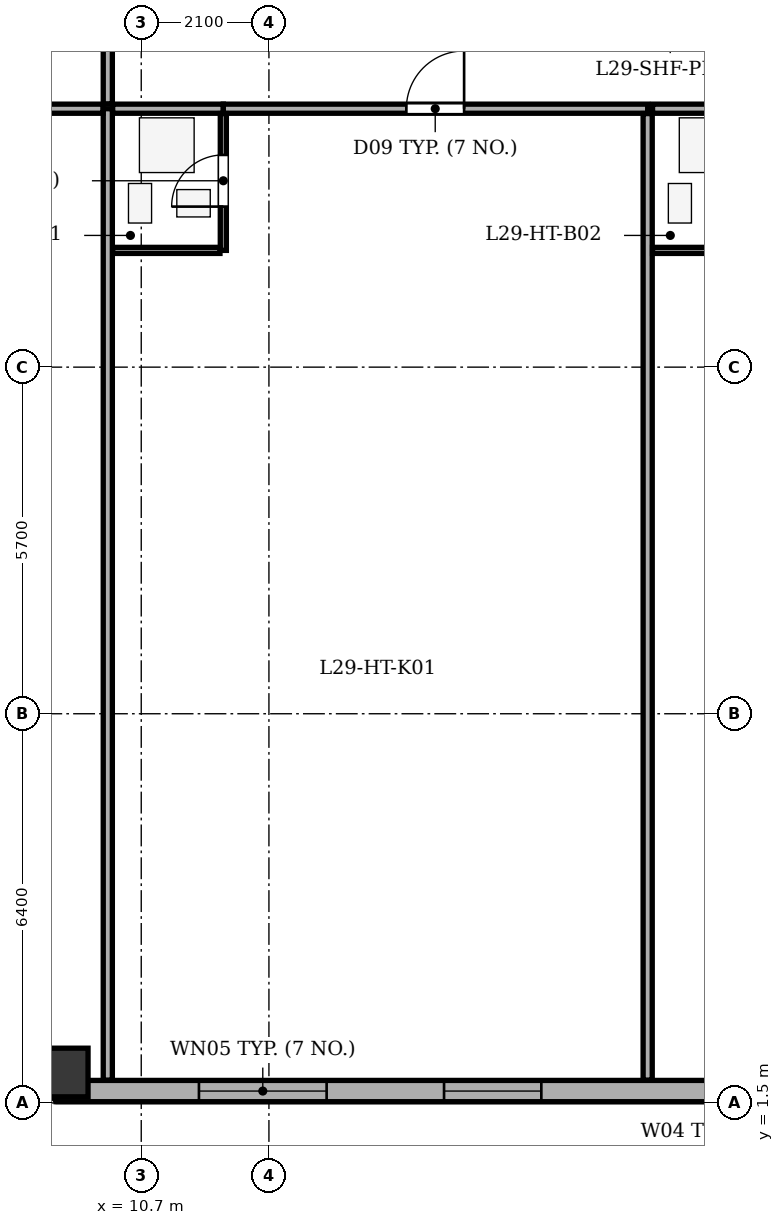
"""IFC4 building model, lengths in metres.
Left out: names, types, materials, properties, quantities, classifications, styles, units other than length and angle.
Written with IfcOpenShell. Run it as: python <this file> out.ifc"""

import sys

from ifc_helpers import new_model, si_unit, direction, frame, frame_2d, origin, origin_2d, place, context, subcontext, project, spatial, rectangle, extrude, element, fill, save


model = new_model("IFC4")
c1 = context("Model", 3, precision=1e-05, world=origin(), true_north=direction((0.0, 1.0)))
c2 = subcontext(c1, "Body", "Model", "MODEL_VIEW")
j1 = project(units=[si_unit("LENGTHUNIT", "METRE"), si_unit("PLANEANGLEUNIT", "RADIAN")], contexts=[c1])
p1 = place(None, origin())
s1 = spatial("IfcSite", under=j1, at=p1, CompositionType="ELEMENT")
p2 = place(p1, origin())
s2 = spatial("IfcBuilding", under=s1, at=p2, CompositionType="ELEMENT")
p3 = place(p2, frame((0.0, 0.0, 120.3)))
s3 = spatial("IfcBuildingStorey", under=s2, at=p3, CompositionType="ELEMENT", Elevation=120.3)
p4 = place(p3, frame((9.3, 2.0, 0.0), z_axis=(0.0, 0.0, 1.0), x_axis=(1.0, 0.0, 0.0)))
e1 = element("IfcColumn", 1, at=p4, inside=s3, PredefinedType="COLUMN", context=c2, shape_type="SweptSolid", body=[
    extrude(rectangle(XDim=0.8, YDim=1.05, at=origin_2d()), origin(), (0.0, 0.0, 1.0), 3.5),
])
p5 = place(p3, frame((44.3, 1.695, 0.0), z_axis=(0.0, 0.0, 1.0), x_axis=(-1.0, 0.0, 0.0)))
e2 = element("IfcWall", 2, at=p5, inside=s3, PredefinedType="STANDARD", context=c2, shape_type="SweptSolid", body=[
    extrude(rectangle(XDim=35.0, YDim=0.35, at=frame_2d((17.5, 0.0))), origin(), (0.0, 0.0, 1.0), 2.785),
])
p6 = place(p5, frame((19.6, 0.0, 0.0)))
e3 = element("IfcOpeningElement", 3, at=p6, cuts=e2, PredefinedType="OPENING", context=c2, shape_type="SweptSolid", body=[
    extrude(rectangle(XDim=1.0, YDim=2.02, at=frame_2d((0.5, 1.01))), frame((0.0, 0.185, 0.0), z_axis=(0.0, -1.0, 0.0), x_axis=(1.0, 0.0, 0.0)), (0.0, 0.0, 1.0), 0.37),
])
p7 = place(p5, frame((1.508, 0.0, 0.75)))
e4 = element("IfcOpeningElement", 4, at=p7, cuts=e2, PredefinedType="OPENING", context=c2, shape_type="SweptSolid", body=[
    extrude(rectangle(XDim=1.6, YDim=1.75, at=frame_2d((0.8, 0.875))), frame((0.0, 0.185, 0.0), z_axis=(0.0, -1.0, 0.0), x_axis=(1.0, 0.0, 0.0)), (0.0, 0.0, 1.0), 0.37),
])
p8 = place(p5, frame((4.338, 0.0, 0.75)))
e5 = element("IfcOpeningElement", 5, at=p8, cuts=e2, PredefinedType="OPENING", context=c2, shape_type="SweptSolid", body=[
    extrude(rectangle(XDim=1.6, YDim=1.75, at=frame_2d((0.8, 0.875))), frame((0.0, 0.185, 0.0), z_axis=(0.0, -1.0, 0.0), x_axis=(1.0, 0.0, 0.0)), (0.0, 0.0, 1.0), 0.37),
])
p9 = place(p5, frame((10.406, 0.0, 0.75)))
e6 = element("IfcOpeningElement", 6, at=p9, cuts=e2, PredefinedType="OPENING", context=c2, shape_type="SweptSolid", body=[
    extrude(rectangle(XDim=1.6, YDim=1.75, at=frame_2d((0.8, 0.875))), frame((0.0, 0.185, 0.0), z_axis=(0.0, -1.0, 0.0), x_axis=(1.0, 0.0, 0.0)), (0.0, 0.0, 1.0), 0.37),
])
p10 = place(p5, frame((13.003, 0.0, 0.75)))
e7 = element("IfcOpeningElement", 7, at=p10, cuts=e2, PredefinedType="OPENING", context=c2, shape_type="SweptSolid", body=[
    extrude(rectangle(XDim=1.6, YDim=1.75, at=frame_2d((0.8, 0.875))), frame((0.0, 0.185, 0.0), z_axis=(0.0, -1.0, 0.0), x_axis=(1.0, 0.0, 0.0)), (0.0, 0.0, 1.0), 0.37),
])
p11 = place(p5, frame((27.02, 0.0, 0.75)))
e8 = element("IfcOpeningElement", 8, at=p11, cuts=e2, PredefinedType="OPENING", context=c2, shape_type="SweptSolid", body=[
    extrude(rectangle(XDim=1.6, YDim=1.75, at=frame_2d((0.8, 0.875))), frame((0.0, 0.185, 0.0), z_axis=(0.0, -1.0, 0.0), x_axis=(1.0, 0.0, 0.0)), (0.0, 0.0, 1.0), 0.37),
])
p12 = place(p5, frame((30.551, 0.0, 0.75)))
e9 = element("IfcOpeningElement", 9, at=p12, cuts=e2, PredefinedType="OPENING", context=c2, shape_type="SweptSolid", body=[
    extrude(rectangle(XDim=2.1, YDim=1.75, at=frame_2d((1.05, 0.875))), frame((0.0, 0.185, 0.0), z_axis=(0.0, -1.0, 0.0), x_axis=(1.0, 0.0, 0.0)), (0.0, 0.0, 1.0), 0.37),
])
p13 = place(p3, frame((9.3, 1.695, 0.0), z_axis=(0.0, 0.0, 1.0), x_axis=(-0.707106781187, 0.707106781187, 0.0)))
e10 = element("IfcWall", 10, at=p13, inside=s3, PredefinedType="STANDARD", context=c2, shape_type="SweptSolid", body=[
    extrude(rectangle(XDim=6.795, YDim=0.35, at=frame_2d((3.397, 0.0))), origin(), (0.0, 0.0, 1.0), 2.785),
])
p14 = place(p13, frame((2.698, 0.0, 0.75)))
e11 = element("IfcOpeningElement", 11, at=p14, cuts=e10, PredefinedType="OPENING", context=c2, shape_type="SweptSolid", body=[
    extrude(rectangle(XDim=1.4, YDim=1.65, at=frame_2d((0.7, 0.825))), frame((0.0, 0.185, 0.0), z_axis=(0.0, -1.0, 0.0), x_axis=(1.0, 0.0, 0.0)), (0.0, 0.0, 1.0), 0.37),
])
p15 = place(p3, frame((10.15, 1.875, 0.0), z_axis=(0.0, 0.0, 1.0), x_axis=(0.0, 1.0, 0.0)))
e12 = element("IfcWall", 12, at=p15, inside=s3, PredefinedType="PARTITIONING", context=c2, shape_type="SweptSolid", body=[
    extrude(rectangle(XDim=15.975, YDim=0.15, at=frame_2d((7.988, 0.0))), origin(), (0.0, 0.0, 1.0), 3.2),
])
p16 = place(p3, frame((10.23, 17.85, 0.0), z_axis=(0.0, 0.0, 1.0), x_axis=(1.0, 0.0, 0.0)))
e13 = element("IfcWall", 13, at=p16, inside=s3, PredefinedType="PARTITIONING", context=c2, shape_type="SweptSolid", body=[
    extrude(rectangle(XDim=1.82, YDim=0.15, at=frame_2d((0.91, 0.0))), origin(), (0.0, 0.0, 1.0), 3.2),
])
p17 = place(p3, frame((12.05, 17.85, 0.0), z_axis=(0.0, 0.0, 1.0), x_axis=(1.0, 0.0, 0.0)))
e14 = element("IfcWall", 14, at=p17, inside=s3, PredefinedType="PARTITIONING", context=c2, shape_type="SweptSolid", body=[
    extrude(rectangle(XDim=6.979, YDim=0.15, at=frame_2d((3.49, 0.0))), origin(), (0.0, 0.0, 1.0), 3.2),
])
p18 = place(p17, frame((3.01, 0.0, 0.0)))
e15 = element("IfcOpeningElement", 15, at=p18, cuts=e14, PredefinedType="OPENING", context=c2, shape_type="SweptSolid", body=[
    extrude(rectangle(XDim=0.95, YDim=2.1, at=frame_2d((0.475, 1.05))), frame((0.0, 0.085, 0.0), z_axis=(0.0, -1.0, 0.0), x_axis=(1.0, 0.0, 0.0)), (0.0, 0.0, 1.0), 0.17),
])
p19 = place(p3, frame((12.05, 15.52, 0.0), z_axis=(0.0, 0.0, 1.0), x_axis=(0.0, 1.0, 0.0)))
e16 = element("IfcWall", 16, at=p19, inside=s3, PredefinedType="PARTITIONING", context=c2, shape_type="SweptSolid", body=[
    extrude(rectangle(XDim=2.25, YDim=0.1, at=frame_2d((1.125, 0.0))), origin(), (0.0, 0.0, 1.0), 3.2),
])
p20 = place(p19, frame((0.72, 0.0, 0.0)))
e17 = element("IfcOpeningElement", 17, at=p20, cuts=e16, PredefinedType="OPENING", context=c2, shape_type="SweptSolid", body=[
    extrude(rectangle(XDim=0.85, YDim=2.05, at=frame_2d((0.425, 1.025))), frame((0.0, 0.06, 0.0), z_axis=(0.0, -1.0, 0.0), x_axis=(1.0, 0.0, 0.0)), (0.0, 0.0, 1.0), 0.12),
])
p21 = place(p3, frame((10.23, 15.52, 0.0), z_axis=(0.0, 0.0, 1.0), x_axis=(1.0, 0.0, 0.0)))
e18 = element("IfcWall", 18, at=p21, inside=s3, PredefinedType="PARTITIONING", context=c2, shape_type="SweptSolid", body=[
    extrude(rectangle(XDim=1.765, YDim=0.1, at=frame_2d((0.883, 0.0))), origin(), (0.0, 0.0, 1.0), 3.2),
])
p22 = place(p3, frame((19.029, 1.875, 0.0), z_axis=(0.0, 0.0, 1.0), x_axis=(0.0, 1.0, 0.0)))
e19 = element("IfcWall", 19, at=p22, inside=s3, PredefinedType="PARTITIONING", context=c2, shape_type="SweptSolid", body=[
    extrude(rectangle(XDim=15.895, YDim=0.15, at=frame_2d((7.948, 0.0))), origin(), (0.0, 0.0, 1.0), 3.2),
])
p23 = place(p3, frame((19.109, 17.85, 0.0), z_axis=(0.0, 0.0, 1.0), x_axis=(1.0, 0.0, 0.0)))
e20 = element("IfcWall", 20, at=p23, inside=s3, PredefinedType="PARTITIONING", context=c2, shape_type="SweptSolid", body=[
    extrude(rectangle(XDim=1.82, YDim=0.15, at=frame_2d((0.91, 0.0))), origin(), (0.0, 0.0, 1.0), 3.2),
])
p24 = place(p3, frame((19.109, 15.52, 0.0), z_axis=(0.0, 0.0, 1.0), x_axis=(1.0, 0.0, 0.0)))
e21 = element("IfcWall", 21, at=p24, inside=s3, PredefinedType="PARTITIONING", context=c2, shape_type="SweptSolid", body=[
    extrude(rectangle(XDim=1.765, YDim=0.1, at=frame_2d((0.883, 0.0))), origin(), (0.0, 0.0, 1.0), 3.2),
])
p25 = place(p3, frame((4.675, 17.85, 0.0), z_axis=(0.0, 0.0, 1.0), x_axis=(1.0, 0.0, 0.0)))
e22 = element("IfcWall", 22, at=p25, inside=s3, PredefinedType="PARTITIONING", context=c2, shape_type="SweptSolid", body=[
    extrude(rectangle(XDim=5.395, YDim=0.15, at=frame_2d((2.698, 0.0))), origin(), (0.0, 0.0, 1.0), 3.2),
])
p26 = place(p3, frame((10.15, 17.93, 0.0), z_axis=(0.0, 0.0, 1.0), x_axis=(0.0, 1.0, 0.0)))
e23 = element("IfcWall", 23, at=p26, inside=s3, PredefinedType="PARTITIONING", context=c2, shape_type="SweptSolid", body=[
    extrude(rectangle(XDim=18.54, YDim=0.15, at=frame_2d((9.27, 0.0))), origin(), (0.0, 0.0, 1.0), 3.2),
])
p27 = place(p26, frame((8.79, 0.0, 0.0)))
e24 = element("IfcOpeningElement", 24, at=p27, cuts=e23, PredefinedType="OPENING", context=c2, shape_type="SweptSolid", body=[
    extrude(rectangle(XDim=0.95, YDim=2.1, at=frame_2d((0.475, 1.05))), frame((0.0, 0.085, 0.0), z_axis=(0.0, -1.0, 0.0), x_axis=(1.0, 0.0, 0.0)), (0.0, 0.0, 1.0), 0.17),
])
p28 = place(p11, origin())
e25 = element("IfcWindow", 25, at=p28, inside=s3, PartitioningType="SINGLE_PANEL", PredefinedType="WINDOW", context=c2, shape_type="SweptSolid", body=[
    extrude(rectangle(XDim=1.6, YDim=1.75, at=frame_2d((0.8, 0.875))), frame((0.0, -0.01, 0.0), z_axis=(0.0, -1.0, 0.0), x_axis=(1.0, 0.0, 0.0)), (0.0, 0.0, 1.0), 0.06),
])
fill(e8, e25)
p29 = place(p12, origin())
e26 = element("IfcWindow", 26, at=p29, inside=s3, PartitioningType="SINGLE_PANEL", PredefinedType="WINDOW", context=c2, shape_type="SweptSolid", body=[
    extrude(rectangle(XDim=2.1, YDim=1.75, at=frame_2d((1.05, 0.875))), frame((0.0, -0.01, 0.0), z_axis=(0.0, -1.0, 0.0), x_axis=(1.0, 0.0, 0.0)), (0.0, 0.0, 1.0), 0.06),
])
fill(e9, e26)
p30 = place(p20, origin())
e27 = element("IfcDoor", 27, at=p30, inside=s3, OperationType="SINGLE_SWING_LEFT", PredefinedType="DOOR", context=c2, shape_type="SweptSolid", body=[
    extrude(rectangle(XDim=0.85, YDim=2.05, at=frame_2d((0.425, 1.025))), frame((0.0, 0.025, 0.0), z_axis=(0.0, -1.0, 0.0), x_axis=(1.0, 0.0, 0.0)), (0.0, 0.0, 1.0), 0.05),
])
fill(e17, e27)
p31 = place(p18, origin())
e28 = element("IfcDoor", 28, at=p31, inside=s3, OperationType="SINGLE_SWING_RIGHT", PredefinedType="DOOR", context=c2, shape_type="SweptSolid", body=[
    extrude(rectangle(XDim=0.95, YDim=2.1, at=frame_2d((0.475, 1.05))), frame((0.0, 0.025, 0.0), z_axis=(0.0, -1.0, 0.0), x_axis=(1.0, 0.0, 0.0)), (0.0, 0.0, 1.0), 0.05),
])
fill(e15, e28)
save(model, sys.argv[1])
